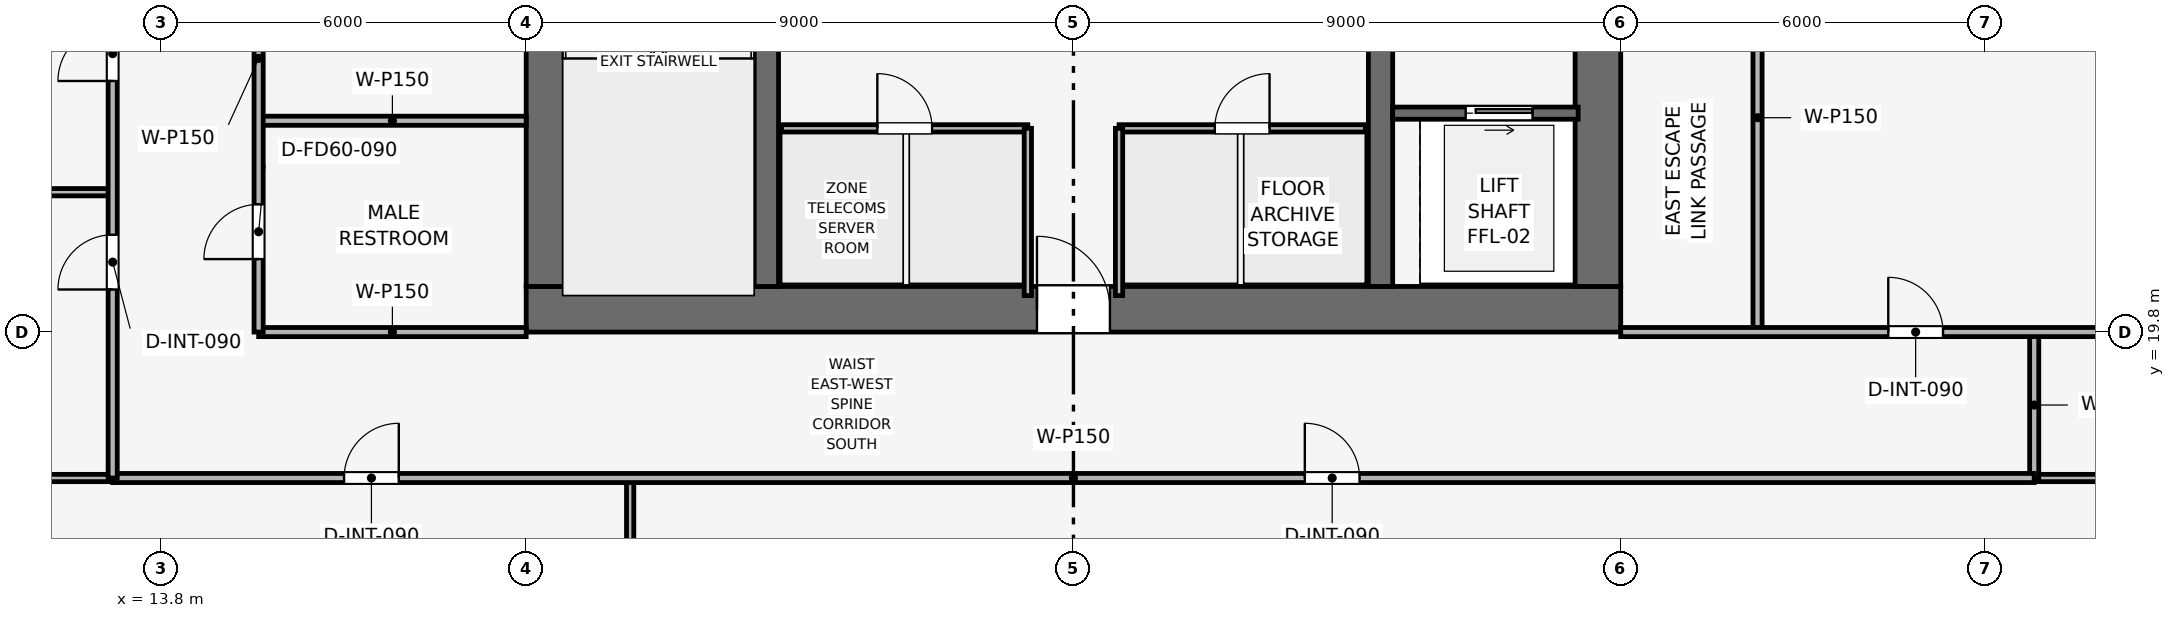
"""IFC4 building model, lengths in metres.
Left out: names, types, materials, properties, quantities, classifications, styles, units other than length and angle.
Written with IfcOpenShell. Run it as: python <this file> out.ifc"""

import sys

from ifc_helpers import new_model, si_unit, direction, frame, frame_2d, origin, place, context, subcontext, project, spatial, rectangle, extrude, element, fill, save


model = new_model("IFC4")
c1 = context("Model", 3, precision=1e-05, world=origin(), true_north=direction((0.0, 1.0)))
c2 = subcontext(c1, "Body", "Model", "MODEL_VIEW")
j1 = project(units=[si_unit("LENGTHUNIT", "METRE"), si_unit("PLANEANGLEUNIT", "RADIAN")], contexts=[c1])
p1 = place(None, origin())
s1 = spatial("IfcSite", under=j1, at=p1, CompositionType="ELEMENT")
p2 = place(p1, origin())
s2 = spatial("IfcBuilding", under=s1, at=p2, CompositionType="ELEMENT")
p3 = place(p2, frame((0.0, 0.0, 199.95)))
s3 = spatial("IfcBuildingStorey", under=s2, at=p3, CompositionType="ELEMENT", Elevation=199.95)
p4 = place(p3, frame((19.8, 20.175, 0.0), z_axis=(0.0, 0.0, 1.0), x_axis=(1.0, 0.0, 0.0)))
e1 = element("IfcWall", 1, at=p4, inside=s3, PredefinedType="SHEAR", context=c2, shape_type="SweptSolid", body=[
    extrude(rectangle(XDim=18.0, YDim=0.75, at=frame_2d((9.0, 0.0))), origin(), (0.0, 0.0, 1.0), 3.75),
])
p5 = place(p4, frame((8.4, 0.0, 0.0)))
e2 = element("IfcOpeningElement", 2, at=p5, cuts=e1, PredefinedType="OPENING", context=c2, shape_type="SweptSolid", body=[
    extrude(rectangle(XDim=1.2, YDim=2.2, at=frame_2d((0.6, 1.1))), frame((0.0, 0.385, 0.0), z_axis=(0.0, -1.0, 0.0), x_axis=(1.0, 0.0, 0.0)), (0.0, 0.0, 1.0), 0.77),
])
p6 = place(p3, frame((20.175, 20.55, 0.0), z_axis=(0.0, 0.0, 1.0), x_axis=(0.0, 1.0, 0.0)))
e3 = element("IfcWall", 3, at=p6, inside=s3, PredefinedType="SHEAR", context=c2, shape_type="SweptSolid", body=[
    extrude(rectangle(XDim=16.5, YDim=0.75, at=frame_2d((8.25, 0.0))), origin(), (0.0, 0.0, 1.0), 3.75),
])
p7 = place(p6, frame((10.25, 0.0, 0.0)))
e4 = element("IfcOpeningElement", 4, at=p7, cuts=e3, PredefinedType="OPENING", context=c2, shape_type="SweptSolid", body=[
    extrude(rectangle(XDim=1.1, YDim=2.15, at=frame_2d((0.55, 1.075))), frame((0.0, 0.385, 0.0), z_axis=(0.0, -1.0, 0.0), x_axis=(1.0, 0.0, 0.0)), (0.0, 0.0, 1.0), 0.77),
])
p8 = place(p3, frame((37.425, 20.55, 0.0), z_axis=(0.0, 0.0, 1.0), x_axis=(0.0, 1.0, 0.0)))
e5 = element("IfcWall", 5, at=p8, inside=s3, PredefinedType="SHEAR", context=c2, shape_type="SweptSolid", body=[
    extrude(rectangle(XDim=16.5, YDim=0.75, at=frame_2d((8.25, 0.0))), origin(), (0.0, 0.0, 1.0), 3.75),
])
p9 = place(p8, frame((4.75, 0.0, 0.0)))
e6 = element("IfcOpeningElement", 6, at=p9, cuts=e5, PredefinedType="OPENING", context=c2, shape_type="SweptSolid", body=[
    extrude(rectangle(XDim=1.1, YDim=2.15, at=frame_2d((0.55, 1.075))), frame((0.0, 0.385, 0.0), z_axis=(0.0, -1.0, 0.0), x_axis=(1.0, 0.0, 0.0)), (0.0, 0.0, 1.0), 0.77),
])
for number, where, z_axis, x_axis in (
    (7, (23.75, 20.55, 0.0), (0.0, 0.0, 1.0), (0.0, 1.0, 0.0)),
    (8, (33.85, 20.55, 0.0), (0.0, 0.0, 1.0), (0.0, 1.0, 0.0)),
):
    element("IfcWall", number, at=place(p3, frame(where, z_axis=z_axis, x_axis=x_axis)), inside=s3, PredefinedType="SHEAR", context=c2, shape_type="SweptSolid", body=[
        extrude(rectangle(XDim=16.5, YDim=0.4, at=frame_2d((8.25, 0.0))), origin(), (0.0, 0.0, 1.0), 3.75),
    ])
p10 = place(p3, frame((34.05, 23.4, 0.0), z_axis=(0.0, 0.0, 1.0), x_axis=(1.0, 0.0, 0.0)))
e9 = element("IfcWall", 9, at=p10, inside=s3, PredefinedType="SHEAR", context=c2, shape_type="SweptSolid", body=[
    extrude(rectangle(XDim=3.05, YDim=0.2, at=frame_2d((1.525, 0.0))), origin(), (0.0, 0.0, 1.0), 3.5),
])
p11 = place(p10, frame((1.2, 0.0, 0.0)))
e10 = element("IfcOpeningElement", 10, at=p11, cuts=e9, PredefinedType="OPENING", context=c2, shape_type="SweptSolid", body=[
    extrude(rectangle(XDim=1.1, YDim=2.15, at=frame_2d((0.55, 1.075))), frame((0.0, 0.11, 0.0), z_axis=(0.0, -1.0, 0.0), x_axis=(1.0, 0.0, 0.0)), (0.0, 0.0, 1.0), 0.22),
])
p12 = place(p3, frame((24.0, 23.15, 0.0), z_axis=(0.0, 0.0, 1.0), x_axis=(1.0, 0.0, 0.0)))
e11 = element("IfcWall", 11, at=p12, inside=s3, PredefinedType="PARTITIONING", context=c2, shape_type="SweptSolid", body=[
    extrude(rectangle(XDim=4.05, YDim=0.12, at=frame_2d((2.025, 0.0))), origin(), (0.0, 0.0, 1.0), 3.5),
])
p13 = place(p12, frame((1.575, 0.0, 0.0)))
e12 = element("IfcOpeningElement", 12, at=p13, cuts=e11, PredefinedType="OPENING", context=c2, shape_type="SweptSolid", body=[
    extrude(rectangle(XDim=0.9, YDim=2.1, at=frame_2d((0.45, 1.05))), frame((0.0, 0.07, 0.0), z_axis=(0.0, -1.0, 0.0), x_axis=(1.0, 0.0, 0.0)), (0.0, 0.0, 1.0), 0.14),
])
p14 = place(p3, frame((28.05, 20.4, 0.0), z_axis=(0.0, 0.0, 1.0), x_axis=(0.0, 1.0, 0.0)))
e13 = element("IfcWall", 13, at=p14, inside=s3, PredefinedType="PARTITIONING", context=c2, shape_type="SweptSolid", body=[
    extrude(rectangle(XDim=2.75, YDim=0.12, at=frame_2d((1.375, 0.0))), origin(), (0.0, 0.0, 1.0), 3.5),
])
p15 = place(p3, frame((29.55, 23.15, 0.0), z_axis=(0.0, 0.0, 1.0), x_axis=(1.0, 0.0, 0.0)))
e14 = element("IfcWall", 14, at=p15, inside=s3, PredefinedType="PARTITIONING", context=c2, shape_type="SweptSolid", body=[
    extrude(rectangle(XDim=4.05, YDim=0.12, at=frame_2d((2.025, 0.0))), origin(), (0.0, 0.0, 1.0), 3.5),
])
p16 = place(p15, frame((1.575, 0.0, 0.0)))
e15 = element("IfcOpeningElement", 15, at=p16, cuts=e14, PredefinedType="OPENING", context=c2, shape_type="SweptSolid", body=[
    extrude(rectangle(XDim=0.9, YDim=2.1, at=frame_2d((0.45, 1.05))), frame((0.0, 0.07, 0.0), z_axis=(0.0, -1.0, 0.0), x_axis=(1.0, 0.0, 0.0)), (0.0, 0.0, 1.0), 0.14),
])
p17 = place(p3, frame((29.55, 20.4, 0.0), z_axis=(0.0, 0.0, 1.0), x_axis=(0.0, 1.0, 0.0)))
e16 = element("IfcWall", 16, at=p17, inside=s3, PredefinedType="PARTITIONING", context=c2, shape_type="SweptSolid", body=[
    extrude(rectangle(XDim=2.75, YDim=0.12, at=frame_2d((1.375, 0.0))), origin(), (0.0, 0.0, 1.0), 3.5),
])
p18 = place(p3, frame((15.4, 19.8, 0.0), z_axis=(0.0, 0.0, 1.0), x_axis=(1.0, 0.0, 0.0)))
e17 = element("IfcWall", 17, at=p18, inside=s3, PredefinedType="PARTITIONING", context=c2, shape_type="SweptSolid", body=[
    extrude(rectangle(XDim=4.4, YDim=0.15, at=frame_2d((2.2, 0.0))), origin(), (0.0, 0.0, 1.0), 3.035),
])
p19 = place(p3, frame((15.4, 23.275, 0.0), z_axis=(0.0, 0.0, 1.0), x_axis=(1.0, 0.0, 0.0)))
e18 = element("IfcWall", 18, at=p19, inside=s3, PredefinedType="PARTITIONING", context=c2, shape_type="SweptSolid", body=[
    extrude(rectangle(XDim=4.4, YDim=0.15, at=frame_2d((2.2, 0.0))), origin(), (0.0, 0.0, 1.0), 3.5),
])
p20 = place(p3, frame((15.4, 19.8, 0.0), z_axis=(0.0, 0.0, 1.0), x_axis=(0.0, 1.0, 0.0)))
e19 = element("IfcWall", 19, at=p20, inside=s3, PredefinedType="PARTITIONING", context=c2, shape_type="SweptSolid", body=[
    extrude(rectangle(XDim=10.35, YDim=0.15, at=frame_2d((5.175, 0.0))), origin(), (0.0, 0.0, 1.0), 3.035),
])
p21 = place(p20, frame((1.2, 0.0, 0.0)))
e20 = element("IfcOpeningElement", 20, at=p21, cuts=e19, PredefinedType="OPENING", context=c2, shape_type="SweptSolid", body=[
    extrude(rectangle(XDim=0.9, YDim=2.1, at=frame_2d((0.45, 1.05))), frame((0.0, 0.085, 0.0), z_axis=(0.0, -1.0, 0.0), x_axis=(1.0, 0.0, 0.0)), (0.0, 0.0, 1.0), 0.17),
])
p22 = place(p20, frame((4.7, 0.0, 0.0)))
e21 = element("IfcOpeningElement", 21, at=p22, cuts=e19, PredefinedType="OPENING", context=c2, shape_type="SweptSolid", body=[
    extrude(rectangle(XDim=0.9, YDim=2.1, at=frame_2d((0.45, 1.05))), frame((0.0, 0.085, 0.0), z_axis=(0.0, -1.0, 0.0), x_axis=(1.0, 0.0, 0.0)), (0.0, 0.0, 1.0), 0.17),
])
p23 = place(p20, frame((8.1, 0.0, 0.0)))
e22 = element("IfcOpeningElement", 22, at=p23, cuts=e19, PredefinedType="OPENING", context=c2, shape_type="SweptSolid", body=[
    extrude(rectangle(XDim=0.95, YDim=2.1, at=frame_2d((0.475, 1.05))), frame((0.0, 0.085, 0.0), z_axis=(0.0, -1.0, 0.0), x_axis=(1.0, 0.0, 0.0)), (0.0, 0.0, 1.0), 0.17),
])
p24 = place(p3, frame((40.05, 19.8, 0.0), z_axis=(0.0, 0.0, 1.0), x_axis=(0.0, 1.0, 0.0)))
e23 = element("IfcWall", 23, at=p24, inside=s3, PredefinedType="PARTITIONING", context=c2, shape_type="SweptSolid", body=[
    extrude(rectangle(XDim=7.05, YDim=0.15, at=frame_2d((3.525, 0.0))), origin(), (0.0, 0.0, 1.0), 3.035),
])
p25 = place(p3, frame((21.51, 1.93, 0.0), z_axis=(0.0, 0.0, 1.0), x_axis=(0.0, 1.0, 0.0)))
e24 = element("IfcWall", 24, at=p25, inside=s3, PredefinedType="PARTITIONING", context=c2, shape_type="SweptSolid", body=[
    extrude(rectangle(XDim=15.47, YDim=0.12, at=frame_2d((7.735, 0.0))), origin(), (0.0, 0.0, 1.0), 2.885),
])
for number, where, z_axis, x_axis in (
    (25, (1.93, 22.1, 0.0), (0.0, 0.0, 1.0), (1.0, 0.0, 0.0)),
    (26, (1.93, 17.4, 0.0), (0.0, 0.0, 1.0), (1.0, 0.0, 0.0)),
):
    element("IfcWall", number, at=place(p3, frame(where, z_axis=z_axis, x_axis=x_axis)), inside=s3, PredefinedType="PARTITIONING", context=c2, shape_type="SweptSolid", body=[
        extrude(rectangle(XDim=11.07, YDim=0.12, at=frame_2d((5.535, 0.0))), origin(), (0.0, 0.0, 1.0), 2.885),
    ])
p26 = place(p3, frame((44.6, 17.4, 0.0), z_axis=(0.0, 0.0, 1.0), x_axis=(1.0, 0.0, 0.0)))
e27 = element("IfcWall", 27, at=p26, inside=s3, PredefinedType="PARTITIONING", context=c2, shape_type="SweptSolid", body=[
    extrude(rectangle(XDim=11.07, YDim=0.12, at=frame_2d((5.535, 0.0))), origin(), (0.0, 0.0, 1.0), 2.885),
])
p27 = place(p3, frame((44.6, 17.4, 0.0), z_axis=(0.0, 0.0, 1.0), x_axis=(0.0, 1.0, 0.0)))
e28 = element("IfcWall", 28, at=p27, inside=s3, PredefinedType="PARTITIONING", context=c2, shape_type="SweptSolid", body=[
    extrude(rectangle(XDim=2.4, YDim=0.15, at=frame_2d((1.2, 0.0))), origin(), (0.0, 0.0, 1.0), 3.5),
])
p28 = place(p3, frame((37.8, 19.8, 0.0), z_axis=(0.0, 0.0, 1.0), x_axis=(1.0, 0.0, 0.0)))
e29 = element("IfcWall", 29, at=p28, inside=s3, PredefinedType="PARTITIONING", context=c2, shape_type="SweptSolid", body=[
    extrude(rectangle(XDim=17.87, YDim=0.15, at=frame_2d((8.935, 0.0))), origin(), (0.0, 0.0, 1.0), 2.885),
])
p29 = place(p28, frame((4.4, 0.0, 0.0)))
e30 = element("IfcOpeningElement", 30, at=p29, cuts=e29, PredefinedType="OPENING", context=c2, shape_type="SweptSolid", body=[
    extrude(rectangle(XDim=0.9, YDim=2.1, at=frame_2d((0.45, 1.05))), frame((0.0, 0.085, 0.0), z_axis=(0.0, -1.0, 0.0), x_axis=(1.0, 0.0, 0.0)), (0.0, 0.0, 1.0), 0.17),
])
p30 = place(p3, frame((13.0, 17.4, 0.0), z_axis=(0.0, 0.0, 1.0), x_axis=(1.0, 0.0, 0.0)))
e31 = element("IfcWall", 31, at=p30, inside=s3, PredefinedType="PARTITIONING", context=c2, shape_type="SweptSolid", body=[
    extrude(rectangle(XDim=31.6, YDim=0.15, at=frame_2d((15.8, 0.0))), origin(), (0.0, 0.0, 1.0), 3.035),
])
p31 = place(p30, frame((3.805, 0.0, 0.0)))
e32 = element("IfcOpeningElement", 32, at=p31, cuts=e31, PredefinedType="OPENING", context=c2, shape_type="SweptSolid", body=[
    extrude(rectangle(XDim=0.9, YDim=2.1, at=frame_2d((0.45, 1.05))), frame((0.0, 0.085, 0.0), z_axis=(0.0, -1.0, 0.0), x_axis=(1.0, 0.0, 0.0)), (0.0, 0.0, 1.0), 0.17),
])
p32 = place(p30, frame((19.605, 0.0, 0.0)))
e33 = element("IfcOpeningElement", 33, at=p32, cuts=e31, PredefinedType="OPENING", context=c2, shape_type="SweptSolid", body=[
    extrude(rectangle(XDim=0.9, YDim=2.1, at=frame_2d((0.45, 1.05))), frame((0.0, 0.085, 0.0), z_axis=(0.0, -1.0, 0.0), x_axis=(1.0, 0.0, 0.0)), (0.0, 0.0, 1.0), 0.17),
])
p33 = place(p3, frame((13.0, 17.4, 0.0), z_axis=(0.0, 0.0, 1.0), x_axis=(0.0, 1.0, 0.0)))
e34 = element("IfcWall", 34, at=p33, inside=s3, PredefinedType="PARTITIONING", context=c2, shape_type="SweptSolid", body=[
    extrude(rectangle(XDim=22.8, YDim=0.15, at=frame_2d((11.4, 0.0))), origin(), (0.0, 0.0, 1.0), 3.035),
])
p34 = place(p33, frame((3.1, 0.0, 0.0)))
e35 = element("IfcOpeningElement", 35, at=p34, cuts=e34, PredefinedType="OPENING", context=c2, shape_type="SweptSolid", body=[
    extrude(rectangle(XDim=0.9, YDim=2.1, at=frame_2d((0.45, 1.05))), frame((0.0, 0.085, 0.0), z_axis=(0.0, -1.0, 0.0), x_axis=(1.0, 0.0, 0.0)), (0.0, 0.0, 1.0), 0.17),
])
p35 = place(p33, frame((6.529, 0.0, 0.0)))
e36 = element("IfcOpeningElement", 36, at=p35, cuts=e34, PredefinedType="OPENING", context=c2, shape_type="SweptSolid", body=[
    extrude(rectangle(XDim=0.9, YDim=2.1, at=frame_2d((0.45, 1.05))), frame((0.0, 0.085, 0.0), z_axis=(0.0, -1.0, 0.0), x_axis=(1.0, 0.0, 0.0)), (0.0, 0.0, 1.0), 0.17),
])
p36 = place(p33, frame((10.957, 0.0, 0.0)))
e37 = element("IfcOpeningElement", 37, at=p36, cuts=e34, PredefinedType="OPENING", context=c2, shape_type="SweptSolid", body=[
    extrude(rectangle(XDim=0.9, YDim=2.1, at=frame_2d((0.45, 1.05))), frame((0.0, 0.085, 0.0), z_axis=(0.0, -1.0, 0.0), x_axis=(1.0, 0.0, 0.0)), (0.0, 0.0, 1.0), 0.17),
])
p37 = place(p33, frame((16.527, 0.0, 0.0)))
e38 = element("IfcOpeningElement", 38, at=p37, cuts=e34, PredefinedType="OPENING", context=c2, shape_type="SweptSolid", body=[
    extrude(rectangle(XDim=0.9, YDim=2.1, at=frame_2d((0.45, 1.05))), frame((0.0, 0.085, 0.0), z_axis=(0.0, -1.0, 0.0), x_axis=(1.0, 0.0, 0.0)), (0.0, 0.0, 1.0), 0.17),
])
p38 = place(p11, origin())
e39 = element("IfcDoor", 39, at=p38, inside=s3, OperationType="SLIDING_TO_RIGHT", PredefinedType="DOOR", context=c2, shape_type="SweptSolid", body=[
    extrude(rectangle(XDim=1.1, YDim=2.15, at=frame_2d((0.55, 1.075))), frame((0.0, 0.025, 0.0), z_axis=(0.0, -1.0, 0.0), x_axis=(1.0, 0.0, 0.0)), (0.0, 0.0, 1.0), 0.05),
])
fill(e10, e39)
p39 = place(p13, origin())
e40 = element("IfcDoor", 40, at=p39, inside=s3, OperationType="SINGLE_SWING_LEFT", PredefinedType="DOOR", context=c2, shape_type="SweptSolid", body=[
    extrude(rectangle(XDim=0.9, YDim=2.1, at=frame_2d((0.45, 1.05))), frame((0.0, 0.025, 0.0), z_axis=(0.0, -1.0, 0.0), x_axis=(1.0, 0.0, 0.0)), (0.0, 0.0, 1.0), 0.05),
])
fill(e12, e40)
p40 = place(p16, origin())
e41 = element("IfcDoor", 41, at=p40, inside=s3, OperationType="SINGLE_SWING_RIGHT", PredefinedType="DOOR", context=c2, shape_type="SweptSolid", body=[
    extrude(rectangle(XDim=0.9, YDim=2.1, at=frame_2d((0.45, 1.05))), frame((0.0, 0.025, 0.0), z_axis=(0.0, -1.0, 0.0), x_axis=(1.0, 0.0, 0.0)), (0.0, 0.0, 1.0), 0.05),
])
fill(e15, e41)
p41 = place(p21, origin())
e42 = element("IfcDoor", 42, at=p41, inside=s3, OperationType="SINGLE_SWING_LEFT", PredefinedType="DOOR", context=c2, shape_type="SweptSolid", body=[
    extrude(rectangle(XDim=0.9, YDim=2.1, at=frame_2d((0.45, 1.05))), frame((0.0, 0.025, 0.0), z_axis=(0.0, -1.0, 0.0), x_axis=(1.0, 0.0, 0.0)), (0.0, 0.0, 1.0), 0.05),
])
fill(e20, e42)
p42 = place(p29, origin())
e43 = element("IfcDoor", 43, at=p42, inside=s3, OperationType="SINGLE_SWING_LEFT", PredefinedType="DOOR", context=c2, shape_type="SweptSolid", body=[
    extrude(rectangle(XDim=0.9, YDim=2.1, at=frame_2d((0.45, 1.05))), frame((0.0, 0.025, 0.0), z_axis=(0.0, -1.0, 0.0), x_axis=(1.0, 0.0, 0.0)), (0.0, 0.0, 1.0), 0.05),
])
fill(e30, e43)
p43 = place(p31, origin())
e44 = element("IfcDoor", 44, at=p43, inside=s3, OperationType="SINGLE_SWING_RIGHT", PredefinedType="DOOR", context=c2, shape_type="SweptSolid", body=[
    extrude(rectangle(XDim=0.9, YDim=2.1, at=frame_2d((0.45, 1.05))), frame((0.0, 0.025, 0.0), z_axis=(0.0, -1.0, 0.0), x_axis=(1.0, 0.0, 0.0)), (0.0, 0.0, 1.0), 0.05),
])
fill(e32, e44)
p44 = place(p32, origin())
e45 = element("IfcDoor", 45, at=p44, inside=s3, OperationType="SINGLE_SWING_LEFT", PredefinedType="DOOR", context=c2, shape_type="SweptSolid", body=[
    extrude(rectangle(XDim=0.9, YDim=2.1, at=frame_2d((0.45, 1.05))), frame((0.0, 0.025, 0.0), z_axis=(0.0, -1.0, 0.0), x_axis=(1.0, 0.0, 0.0)), (0.0, 0.0, 1.0), 0.05),
])
fill(e33, e45)
p45 = place(p34, origin())
e46 = element("IfcDoor", 46, at=p45, inside=s3, OperationType="SINGLE_SWING_LEFT", PredefinedType="DOOR", context=c2, shape_type="SweptSolid", body=[
    extrude(rectangle(XDim=0.9, YDim=2.1, at=frame_2d((0.45, 1.05))), frame((0.0, 0.025, 0.0), z_axis=(0.0, -1.0, 0.0), x_axis=(1.0, 0.0, 0.0)), (0.0, 0.0, 1.0), 0.05),
])
fill(e35, e46)
p46 = place(p35, origin())
e47 = element("IfcDoor", 47, at=p46, inside=s3, OperationType="SINGLE_SWING_LEFT", PredefinedType="DOOR", context=c2, shape_type="SweptSolid", body=[
    extrude(rectangle(XDim=0.9, YDim=2.1, at=frame_2d((0.45, 1.05))), frame((0.0, 0.025, 0.0), z_axis=(0.0, -1.0, 0.0), x_axis=(1.0, 0.0, 0.0)), (0.0, 0.0, 1.0), 0.05),
])
fill(e36, e47)
p47 = place(p5, origin())
e48 = element("IfcDoor", 48, at=p47, inside=s3, OperationType="SINGLE_SWING_LEFT", PredefinedType="DOOR", context=c2, shape_type="SweptSolid", body=[
    extrude(rectangle(XDim=1.2, YDim=2.2, at=frame_2d((0.6, 1.1))), frame((0.0, 0.025, 0.0), z_axis=(0.0, -1.0, 0.0), x_axis=(1.0, 0.0, 0.0)), (0.0, 0.0, 1.0), 0.05),
])
fill(e2, e48)
save(model, sys.argv[1])
